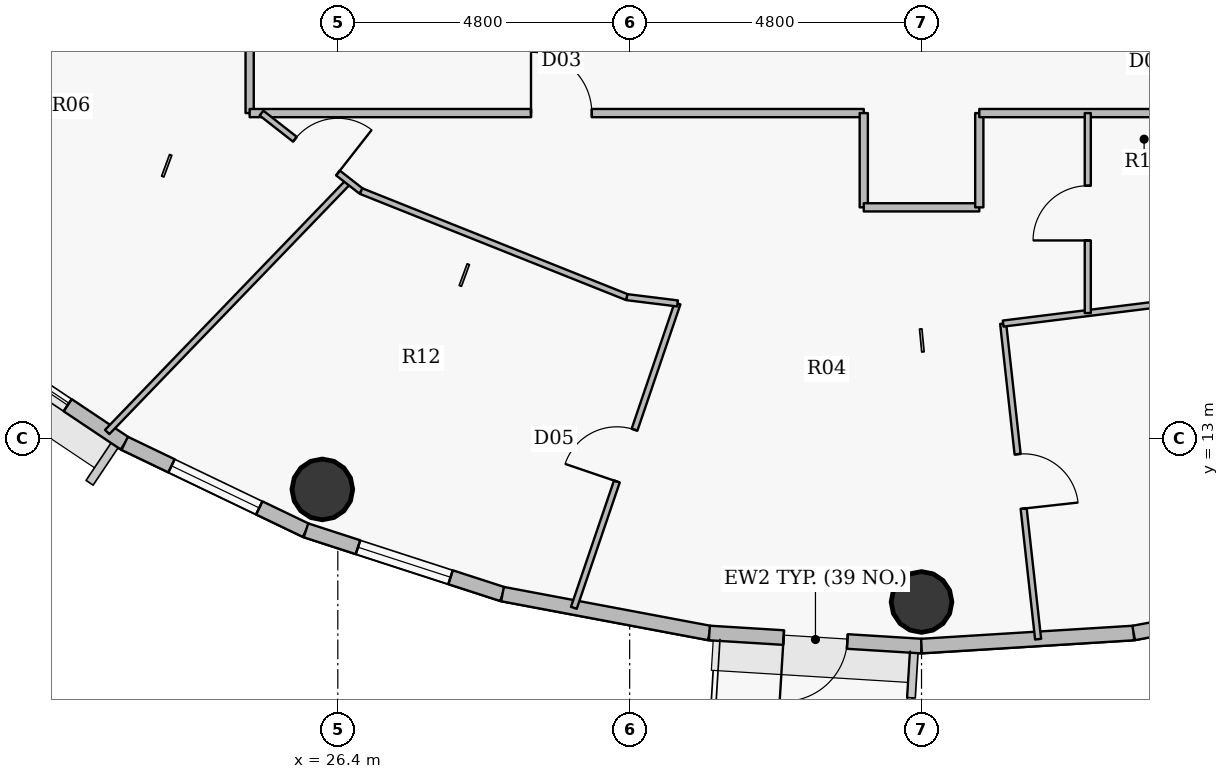
"""IFC4 building model, lengths in metres.
Left out: names, types, materials, properties, quantities, classifications, styles, units other than length and angle.
Written with IfcOpenShell. Run it as: python <this file> out.ifc"""

import sys

from ifc_helpers import new_model, si_unit, direction, frame, frame_2d, origin, origin_2d, place, context, subcontext, project, spatial, rectangle, hollow_circle, extrude, source, transform, mapped, element, fill, save


model = new_model("IFC4")
c1 = context("Model", 3, precision=1e-05, world=origin(), true_north=direction((0.0, 1.0)))
c2 = subcontext(c1, "Body", "Model", "MODEL_VIEW")
j1 = project(units=[si_unit("LENGTHUNIT", "METRE"), si_unit("PLANEANGLEUNIT", "RADIAN")], contexts=[c1])
p1 = place(None, origin())
s1 = spatial("IfcSite", under=j1, at=p1, CompositionType="ELEMENT")
p2 = place(p1, origin())
s2 = spatial("IfcBuilding", under=s1, at=p2, CompositionType="ELEMENT")
p3 = place(p2, frame((0.0, 0.0, 288.0)))
s3 = spatial("IfcBuildingStorey", under=s2, at=p3, CompositionType="ELEMENT", Elevation=288.0)
for number, where, z_axis, x_axis in (
    (1, (26.146, 12.161, 0.0), (0.0, 0.0, 1.0), (1.0, 0.0, 0.0)),
    (2, (36.0, 10.31, 0.0), (0.0, 0.0, 1.0), (1.0, 0.0, 0.0)),
):
    element("IfcColumn", number, at=place(p3, frame(where, z_axis=z_axis, x_axis=x_axis)), inside=s3, PredefinedType="COLUMN", context=c2, shape_type="SweptSolid", body=[
        extrude(hollow_circle(Radius=0.5, WallThickness=0.032, at=origin_2d()), origin(), (0.0, 0.0, 1.0), 3.75),
    ])
p4 = place(p3, frame((22.896, 12.918, 0.0), z_axis=(0.0, 0.0, 1.0), x_axis=(-0.831250592635, 0.55589787933, 0.0)))
e3 = element("IfcWall", 3, at=p4, inside=s3, PredefinedType="SOLIDWALL", context=c2, shape_type="SweptSolid", body=[
    extrude(rectangle(XDim=3.197, YDim=0.24, at=frame_2d((1.599, 0.0))), origin(), (0.0, 0.0, 1.0), 3.5),
])
p5 = place(p4, frame((1.129, 0.0, 0.9)))
e4 = element("IfcOpeningElement", 4, at=p5, cuts=e3, PredefinedType="OPENING", context=c2, shape_type="SweptSolid", body=[
    extrude(rectangle(XDim=1.25, YDim=1.65, at=origin_2d()), frame((0.625, 0.13, 0.825), z_axis=(0.0, -1.0, 0.0), x_axis=(1.0, 0.0, 0.0)), (0.0, 0.0, 1.0), 0.26),
])
p6 = place(p3, frame((25.877, 11.488, 0.0), z_axis=(0.0, 0.0, 1.0), x_axis=(-0.901573741254, 0.43262546051, 0.0)))
e5 = element("IfcWall", 5, at=p6, inside=s3, PredefinedType="SOLIDWALL", context=c2, shape_type="SweptSolid", body=[
    extrude(rectangle(XDim=3.307, YDim=0.24, at=frame_2d((1.653, 0.0))), origin(), (0.0, 0.0, 1.0), 3.5),
])
p7 = place(p6, frame((0.853, 0.0, 0.9)))
e6 = element("IfcOpeningElement", 6, at=p7, cuts=e5, PredefinedType="OPENING", context=c2, shape_type="SweptSolid", body=[
    extrude(rectangle(XDim=1.6, YDim=1.75, at=origin_2d()), frame((0.8, 0.13, 0.875), z_axis=(0.0, -1.0, 0.0), x_axis=(1.0, 0.0, 0.0)), (0.0, 0.0, 1.0), 0.26),
])
p8 = place(p3, frame((29.109, 10.44, 0.0), z_axis=(0.0, 0.0, 1.0), x_axis=(-0.95123136723, 0.308478339592, 0.0)))
e7 = element("IfcWall", 7, at=p8, inside=s3, PredefinedType="SOLIDWALL", context=c2, shape_type="SweptSolid", body=[
    extrude(rectangle(XDim=3.398, YDim=0.24, at=frame_2d((1.699, 0.0))), origin(), (0.0, 0.0, 1.0), 3.5),
])
p9 = place(p8, frame((0.899, 0.0, 0.9)))
e8 = element("IfcOpeningElement", 8, at=p9, cuts=e7, PredefinedType="OPENING", context=c2, shape_type="SweptSolid", body=[
    extrude(rectangle(XDim=1.6, YDim=1.75, at=origin_2d()), frame((0.8, 0.13, 0.875), z_axis=(0.0, -1.0, 0.0), x_axis=(1.0, 0.0, 0.0)), (0.0, 0.0, 1.0), 0.26),
])
p10 = place(p3, frame((32.511, 9.8, 0.0), z_axis=(0.0, 0.0, 1.0), x_axis=(-0.982782655757, 0.184765395959, 0.0)))
e9 = element("IfcWall", 9, at=p10, inside=s3, PredefinedType="SOLIDWALL", context=c2, shape_type="SweptSolid", body=[
    extrude(rectangle(XDim=3.462, YDim=0.24, at=frame_2d((1.731, 0.0))), origin(), (0.0, 0.0, 1.0), 3.5),
])
p11 = place(p3, frame((36.0, 9.585, 0.0), z_axis=(0.0, 0.0, 1.0), x_axis=(-0.998104946479, 0.061534671648, 0.0)))
e10 = element("IfcWall", 10, at=p11, inside=s3, PredefinedType="SOLIDWALL", context=c2, shape_type="SweptSolid", body=[
    extrude(rectangle(XDim=3.495, YDim=0.24, at=frame_2d((1.748, 0.0))), origin(), (0.0, 0.0, 1.0), 3.5),
])
p12 = place(p11, frame((1.223, 0.0, 0.0)))
e11 = element("IfcOpeningElement", 11, at=p12, cuts=e10, PredefinedType="OPENING", context=c2, shape_type="SweptSolid", body=[
    extrude(rectangle(XDim=1.05, YDim=2.15, at=origin_2d()), frame((0.525, 0.13, 1.075), z_axis=(0.0, -1.0, 0.0), x_axis=(1.0, 0.0, 0.0)), (0.0, 0.0, 1.0), 0.26),
])
p13 = place(p3, frame((39.489, 9.8, 0.0), z_axis=(0.0, 0.0, 1.0), x_axis=(-0.998104946479, -0.061534671648, 0.0)))
e12 = element("IfcWall", 12, at=p13, inside=s3, PredefinedType="SOLIDWALL", context=c2, shape_type="SweptSolid", body=[
    extrude(rectangle(XDim=3.495, YDim=0.24, at=frame_2d((1.748, 0.0))), origin(), (0.0, 0.0, 1.0), 3.5),
])
p14 = place(p3, frame((42.891, 10.44, 0.0), z_axis=(0.0, 0.0, 1.0), x_axis=(-0.982782655757, -0.184765395959, 0.0)))
e13 = element("IfcWall", 13, at=p14, inside=s3, PredefinedType="SOLIDWALL", context=c2, shape_type="SweptSolid", body=[
    extrude(rectangle(XDim=3.462, YDim=0.24, at=frame_2d((1.731, 0.0))), origin(), (0.0, 0.0, 1.0), 3.5),
])
p15 = place(p14, frame((1.106, 0.0, 0.9)))
e14 = element("IfcOpeningElement", 14, at=p15, cuts=e13, PredefinedType="OPENING", context=c2, shape_type="SweptSolid", body=[
    extrude(rectangle(XDim=1.25, YDim=1.65, at=origin_2d()), frame((0.625, 0.13, 0.825), z_axis=(0.0, -1.0, 0.0), x_axis=(1.0, 0.0, 0.0)), (0.0, 0.0, 1.0), 0.26),
])
p16 = place(p3, frame((16.007, 19.358, 0.0), z_axis=(0.0, 0.0, 1.0), x_axis=(0.934094110355, 0.35702687994, 0.0)))
e15 = element("IfcWall", 15, at=p16, inside=s3, PredefinedType="PARTITIONING", context=c2, shape_type="SweptSolid", body=[
    extrude(rectangle(XDim=9.574, YDim=0.135, at=frame_2d((4.787, 0.0))), origin(), (0.0, 0.0, 1.0), 2.985),
])
p17 = place(p3, frame((22.607, 13.105, 0.0), z_axis=(0.0, 0.0, 1.0), x_axis=(0.693978480191, 0.71999574237, 0.0)))
e16 = element("IfcWall", 16, at=p17, inside=s3, PredefinedType="PARTITIONING", context=c2, shape_type="SweptSolid", body=[
    extrude(rectangle(XDim=5.724, YDim=0.1, at=frame_2d((2.862, 0.0))), origin(), (0.0, 0.0, 1.0), 2.985),
])
p18 = place(p3, frame((24.95, 18.35, 0.0), z_axis=(0.0, 0.0, 1.0), x_axis=(0.0, 1.0, 0.0)))
e17 = element("IfcWall", 17, at=p18, inside=s3, PredefinedType="PARTITIONING", context=c2, shape_type="SweptSolid", body=[
    extrude(rectangle(XDim=17.147, YDim=0.135, at=frame_2d((8.574, 0.0))), origin(), (0.0, 0.0, 1.0), 3.035),
])
p19 = place(p18, frame((10.267, 0.0, 0.0)))
e18 = element("IfcOpeningElement", 18, at=p19, cuts=e17, PredefinedType="OPENING", context=c2, shape_type="SweptSolid", body=[
    extrude(rectangle(XDim=1.0, YDim=2.15, at=origin_2d()), frame((0.5, 0.078, 1.075), z_axis=(0.0, -1.0, 0.0), x_axis=(1.0, 0.0, 0.0)), (0.0, 0.0, 1.0), 0.155),
])
p20 = place(p3, frame((24.95, 18.35, 0.0), z_axis=(0.0, 0.0, 1.0), x_axis=(1.0, 0.0, 0.0)))
e19 = element("IfcWall", 19, at=p20, inside=s3, PredefinedType="PARTITIONING", context=c2, shape_type="SweptSolid", body=[
    extrude(rectangle(XDim=10.1, YDim=0.135, at=frame_2d((5.05, 0.0))), origin(), (0.0, 0.0, 1.0), 3.035),
])
p21 = place(p20, frame((4.627, 0.0, 0.0)))
e20 = element("IfcOpeningElement", 20, at=p21, cuts=e19, PredefinedType="OPENING", context=c2, shape_type="SweptSolid", body=[
    extrude(rectangle(XDim=1.0, YDim=2.15, at=origin_2d()), frame((0.5, 0.078, 1.075), z_axis=(0.0, -1.0, 0.0), x_axis=(1.0, 0.0, 0.0)), (0.0, 0.0, 1.0), 0.155),
])
p22 = place(p3, frame((25.145, 18.35, 0.0), z_axis=(0.0, 0.0, 1.0), x_axis=(0.787326747019, -0.616535962803, 0.0)))
e21 = element("IfcWall", 21, at=p22, inside=s3, PredefinedType="PARTITIONING", context=c2, shape_type="SweptSolid", body=[
    extrude(rectangle(XDim=2.081, YDim=0.1, at=frame_2d((1.041, 0.0))), origin(), (0.0, 0.0, 1.0), 3.5),
])
p23 = place(p22, frame((0.698, 0.0, 0.0)))
e22 = element("IfcOpeningElement", 22, at=p23, cuts=e21, PredefinedType="OPENING", context=c2, shape_type="SweptSolid", body=[
    extrude(rectangle(XDim=0.9, YDim=2.1, at=origin_2d()), frame((0.45, 0.06, 1.05), z_axis=(0.0, -1.0, 0.0), x_axis=(1.0, 0.0, 0.0)), (0.0, 0.0, 1.0), 0.12),
])
p24 = place(p3, frame((26.783, 17.067, 0.0), z_axis=(0.0, 0.0, 1.0), x_axis=(0.928809047774, -0.370558703544, 0.0)))
e23 = element("IfcWall", 23, at=p24, inside=s3, PredefinedType="PARTITIONING", context=c2, shape_type="SweptSolid", body=[
    extrude(rectangle(XDim=4.706, YDim=0.1, at=frame_2d((2.353, 0.0))), origin(), (0.0, 0.0, 1.0), 3.035),
])
p25 = place(p3, frame((30.282, 10.214, 0.0), z_axis=(0.0, 0.0, 1.0), x_axis=(0.322425759237, 0.946594754782, 0.0)))
e24 = element("IfcWall", 24, at=p25, inside=s3, PredefinedType="PARTITIONING", context=c2, shape_type="SweptSolid", body=[
    extrude(rectangle(XDim=5.288, YDim=0.1, at=frame_2d((2.644, 0.0))), origin(), (0.0, 0.0, 1.0), 2.985),
])
p26 = place(p25, frame((2.194, 0.0, 0.0)))
e25 = element("IfcOpeningElement", 25, at=p26, cuts=e24, PredefinedType="OPENING", context=c2, shape_type="SweptSolid", body=[
    extrude(rectangle(XDim=0.9, YDim=2.1, at=origin_2d()), frame((0.45, 0.06, 1.05), z_axis=(0.0, -1.0, 0.0), x_axis=(1.0, 0.0, 0.0)), (0.0, 0.0, 1.0), 0.12),
])
p27 = place(p3, frame((31.155, 15.323, 0.0), z_axis=(0.0, 0.0, 1.0), x_axis=(0.992393849535, -0.123103401277, 0.0)))
e26 = element("IfcWall", 26, at=p27, inside=s3, PredefinedType="PARTITIONING", context=c2, shape_type="SweptSolid", body=[
    extrude(rectangle(XDim=0.839, YDim=0.1, at=frame_2d((0.419, 0.0))), origin(), (0.0, 0.0, 1.0), 3.5),
])
p28 = place(p3, frame((35.05, 16.8, 0.0), z_axis=(0.0, 0.0, 1.0), x_axis=(0.0, 1.0, 0.0)))
e27 = element("IfcWall", 27, at=p28, inside=s3, PredefinedType="PARTITIONING", context=c2, shape_type="SweptSolid", body=[
    extrude(rectangle(XDim=1.55, YDim=0.135, at=frame_2d((0.775, 0.0))), origin(), (0.0, 0.0, 1.0), 3.5),
])
p29 = place(p3, frame((35.05, 16.8, 0.0), z_axis=(0.0, 0.0, 1.0), x_axis=(1.0, 0.0, 0.0)))
e28 = element("IfcWall", 28, at=p29, inside=s3, PredefinedType="PARTITIONING", context=c2, shape_type="SweptSolid", body=[
    extrude(rectangle(XDim=1.9, YDim=0.135, at=frame_2d((0.95, 0.0))), origin(), (0.0, 0.0, 1.0), 3.035),
])
p30 = place(p3, frame((36.95, 16.8, 0.0), z_axis=(0.0, 0.0, 1.0), x_axis=(0.0, 1.0, 0.0)))
e29 = element("IfcWall", 29, at=p30, inside=s3, PredefinedType="PARTITIONING", context=c2, shape_type="SweptSolid", body=[
    extrude(rectangle(XDim=1.55, YDim=0.135, at=frame_2d((0.775, 0.0))), origin(), (0.0, 0.0, 1.0), 3.5),
])
p31 = place(p3, frame((36.95, 18.35, 0.0), z_axis=(0.0, 0.0, 1.0), x_axis=(1.0, 0.0, 0.0)))
e30 = element("IfcWall", 30, at=p31, inside=s3, PredefinedType="PARTITIONING", context=c2, shape_type="SweptSolid", body=[
    extrude(rectangle(XDim=10.1, YDim=0.135, at=frame_2d((5.05, 0.0))), origin(), (0.0, 0.0, 1.0), 3.035),
])
p32 = place(p3, frame((37.342, 14.888, 0.0), z_axis=(0.0, 0.0, 1.0), x_axis=(0.110149295127, -0.993915053102, 0.0)))
e31 = element("IfcWall", 31, at=p32, inside=s3, PredefinedType="PARTITIONING", context=c2, shape_type="SweptSolid", body=[
    extrude(rectangle(XDim=5.222, YDim=0.1, at=frame_2d((2.611, 0.0))), origin(), (0.0, 0.0, 1.0), 2.985),
])
p33 = place(p32, frame((2.161, 0.0, 0.0)))
e32 = element("IfcOpeningElement", 32, at=p33, cuts=e31, PredefinedType="OPENING", context=c2, shape_type="SweptSolid", body=[
    extrude(rectangle(XDim=0.9, YDim=2.1, at=origin_2d()), frame((0.45, 0.06, 1.05), z_axis=(0.0, -1.0, 0.0), x_axis=(1.0, 0.0, 0.0)), (0.0, 0.0, 1.0), 0.12),
])
p34 = place(p3, frame((37.342, 14.888, 0.0), z_axis=(0.0, 0.0, 1.0), x_axis=(0.992393420873, 0.123106856865, 0.0)))
e33 = element("IfcWall", 33, at=p34, inside=s3, PredefinedType="PARTITIONING", context=c2, shape_type="SweptSolid", body=[
    extrude(rectangle(XDim=3.53, YDim=0.1, at=frame_2d((1.765, 0.0))), origin(), (0.0, 0.0, 1.0), 2.985),
])
p35 = place(p3, frame((38.734, 15.061, 0.0), z_axis=(0.0, 0.0, 1.0), x_axis=(0.0, 1.0, 0.0)))
e34 = element("IfcWall", 34, at=p35, inside=s3, PredefinedType="PARTITIONING", context=c2, shape_type="SweptSolid", body=[
    extrude(rectangle(XDim=3.289, YDim=0.1, at=frame_2d((1.645, 0.0))), origin(), (0.0, 0.0, 1.0), 3.5),
])
p36 = place(p35, frame((1.194, 0.0, 0.0)))
e35 = element("IfcOpeningElement", 35, at=p36, cuts=e34, PredefinedType="OPENING", context=c2, shape_type="SweptSolid", body=[
    extrude(rectangle(XDim=0.9, YDim=2.1, at=origin_2d()), frame((0.45, 0.06, 1.05), z_axis=(0.0, -1.0, 0.0), x_axis=(1.0, 0.0, 0.0)), (0.0, 0.0, 1.0), 0.12),
])
m1 = source(origin(), c2, "Body", "SweptSolid", [
    extrude(rectangle(XDim=1.25, YDim=1.65, at=origin_2d()), frame((0.625, 0.03, 0.825), z_axis=(0.0, -1.0, 0.0), x_axis=(1.0, 0.0, 0.0)), (0.0, 0.0, 1.0), 0.06),
])
p37 = place(p5, origin())
e36 = element("IfcWindow", 36, at=p37, inside=s3, PartitioningType="SINGLE_PANEL", PredefinedType="WINDOW", context=c2, shape_type="MappedRepresentation", body=[
    mapped(m1, transform((0.0, 0.0, 0.0), x_axis=(1.0, 0.0, 0.0), y_axis=(0.0, 1.0, 0.0), z_axis=(0.0, 0.0, 1.0), scale=1.0)),
])
fill(e4, e36)
m2 = source(origin(), c2, "Body", "SweptSolid", [
    extrude(rectangle(XDim=1.6, YDim=1.75, at=origin_2d()), frame((0.8, 0.03, 0.875), z_axis=(0.0, -1.0, 0.0), x_axis=(1.0, 0.0, 0.0)), (0.0, 0.0, 1.0), 0.06),
])
p38 = place(p7, origin())
e37 = element("IfcWindow", 37, at=p38, inside=s3, PartitioningType="DOUBLE_PANEL_VERTICAL", PredefinedType="WINDOW", context=c2, shape_type="MappedRepresentation", body=[
    mapped(m2, transform((0.0, 0.0, 0.0), x_axis=(1.0, 0.0, 0.0), y_axis=(0.0, 1.0, 0.0), z_axis=(0.0, 0.0, 1.0), scale=1.0)),
])
fill(e6, e37)
p39 = place(p9, origin())
e38 = element("IfcWindow", 38, at=p39, inside=s3, PartitioningType="DOUBLE_PANEL_VERTICAL", PredefinedType="WINDOW", context=c2, shape_type="MappedRepresentation", body=[
    mapped(m2, transform((0.0, 0.0, 0.0), x_axis=(1.0, 0.0, 0.0), y_axis=(0.0, 1.0, 0.0), z_axis=(0.0, 0.0, 1.0), scale=1.0)),
])
fill(e8, e38)
m3 = source(origin(), c2, "Body", "SweptSolid", [
    extrude(rectangle(XDim=1.05, YDim=2.15, at=origin_2d()), frame((0.525, 0.025, 1.075), z_axis=(0.0, -1.0, 0.0), x_axis=(1.0, 0.0, 0.0)), (0.0, 0.0, 1.0), 0.05),
])
p40 = place(p12, origin())
e39 = element("IfcDoor", 39, at=p40, inside=s3, OperationType="SINGLE_SWING_RIGHT", PredefinedType="DOOR", context=c2, shape_type="MappedRepresentation", body=[
    mapped(m3, transform((0.0, 0.0, 0.0), x_axis=(1.0, 0.0, 0.0), y_axis=(0.0, 1.0, 0.0), z_axis=(0.0, 0.0, 1.0), scale=1.0)),
])
fill(e11, e39)
m4 = source(origin(), c2, "Body", "SweptSolid", [
    extrude(rectangle(XDim=1.0, YDim=2.15, at=origin_2d()), frame((0.5, 0.025, 1.075), z_axis=(0.0, -1.0, 0.0), x_axis=(1.0, 0.0, 0.0)), (0.0, 0.0, 1.0), 0.05),
])
p41 = place(p21, origin())
e40 = element("IfcDoor", 40, at=p41, inside=s3, OperationType="SINGLE_SWING_LEFT", PredefinedType="DOOR", context=c2, shape_type="MappedRepresentation", body=[
    mapped(m4, transform((0.0, 0.0, 0.0), x_axis=(1.0, 0.0, 0.0), y_axis=(0.0, 1.0, 0.0), z_axis=(0.0, 0.0, 1.0), scale=1.0)),
])
fill(e20, e40)
m5 = source(origin(), c2, "Body", "SweptSolid", [
    extrude(rectangle(XDim=0.9, YDim=2.1, at=origin_2d()), frame((0.45, 0.025, 1.05), z_axis=(0.0, -1.0, 0.0), x_axis=(1.0, 0.0, 0.0)), (0.0, 0.0, 1.0), 0.05),
])
p42 = place(p23, origin())
e41 = element("IfcDoor", 41, at=p42, inside=s3, OperationType="SINGLE_SWING_RIGHT", PredefinedType="DOOR", context=c2, shape_type="MappedRepresentation", body=[
    mapped(m5, transform((0.0, 0.0, 0.0), x_axis=(1.0, 0.0, 0.0), y_axis=(0.0, 1.0, 0.0), z_axis=(0.0, 0.0, 1.0), scale=1.0)),
])
fill(e22, e41)
p43 = place(p26, origin())
e42 = element("IfcDoor", 42, at=p43, inside=s3, OperationType="SINGLE_SWING_LEFT", PredefinedType="DOOR", context=c2, shape_type="MappedRepresentation", body=[
    mapped(m5, transform((0.0, 0.0, 0.0), x_axis=(1.0, 0.0, 0.0), y_axis=(0.0, 1.0, 0.0), z_axis=(0.0, 0.0, 1.0), scale=1.0)),
])
fill(e25, e42)
p44 = place(p33, origin())
e43 = element("IfcDoor", 43, at=p44, inside=s3, OperationType="SINGLE_SWING_RIGHT", PredefinedType="DOOR", context=c2, shape_type="MappedRepresentation", body=[
    mapped(m5, transform((0.0, 0.0, 0.0), x_axis=(1.0, 0.0, 0.0), y_axis=(0.0, 1.0, 0.0), z_axis=(0.0, 0.0, 1.0), scale=1.0)),
])
fill(e32, e43)
p45 = place(p36, origin())
e44 = element("IfcDoor", 44, at=p45, inside=s3, OperationType="SINGLE_SWING_LEFT", PredefinedType="DOOR", context=c2, shape_type="MappedRepresentation", body=[
    mapped(m5, transform((0.0, 0.0, 0.0), x_axis=(1.0, 0.0, 0.0), y_axis=(0.0, 1.0, 0.0), z_axis=(0.0, 0.0, 1.0), scale=1.0)),
])
fill(e35, e44)
save(model, sys.argv[1])
